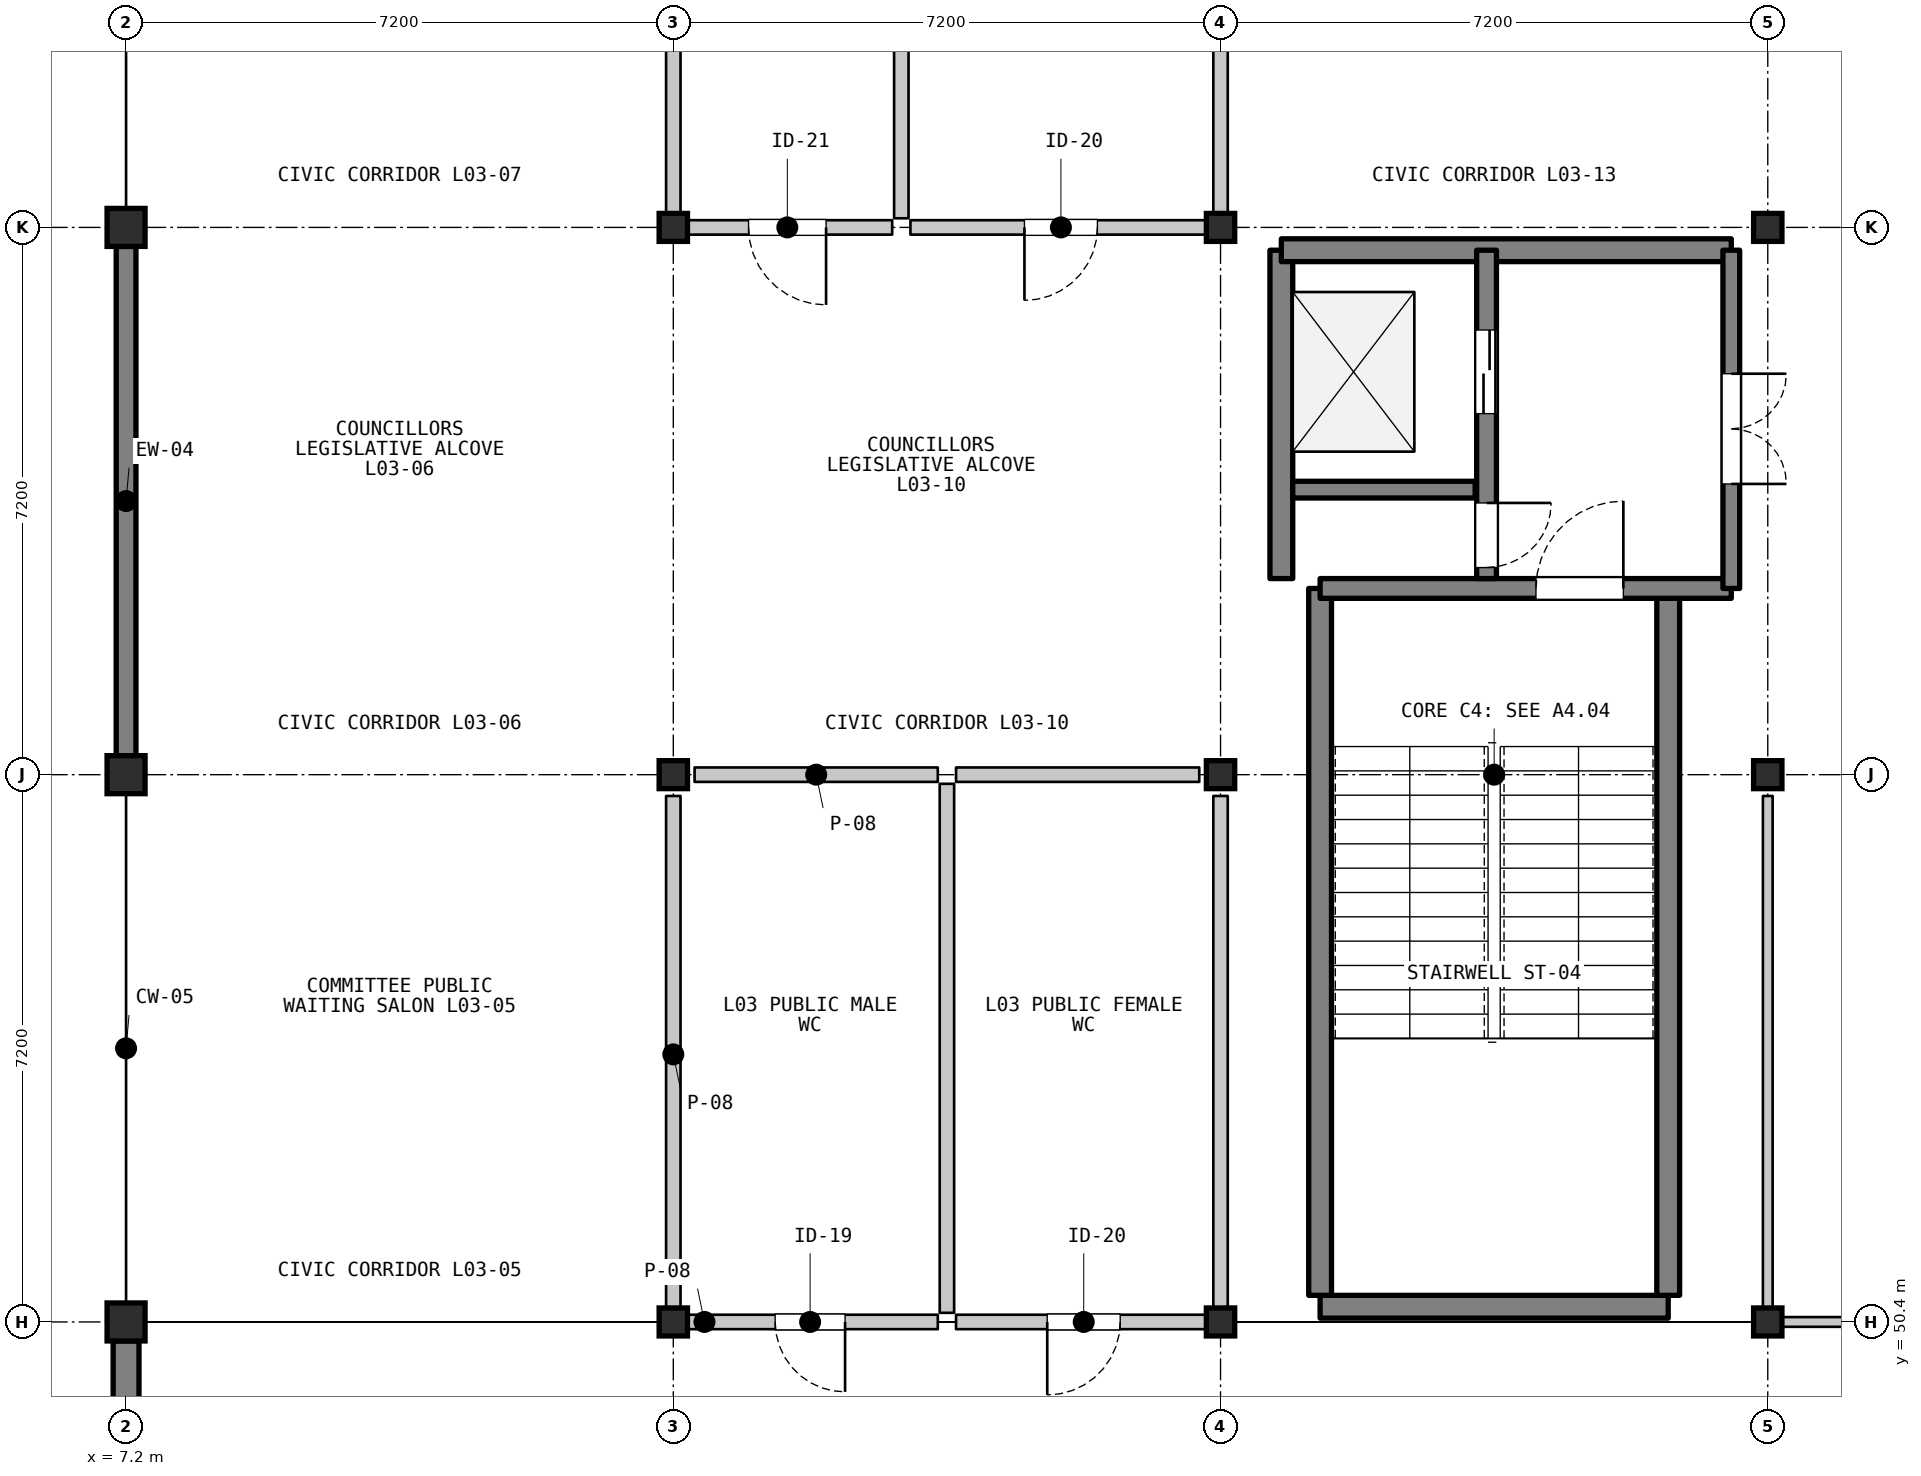
"""IFC4 building model, lengths in metres.
Left out: names, types, materials, properties, quantities, classifications, styles, units other than length and angle.
Written with IfcOpenShell. Run it as: python <this file> out.ifc"""

import sys

from ifc_helpers import new_model, si_unit, direction, frame, frame_2d, origin, origin_2d, place, context, subcontext, project, spatial, rectangle, i_section, extrude, element, fill, save


model = new_model("IFC4")
c1 = context("Model", 3, precision=1e-05, world=origin(), true_north=direction((0.0, 1.0)))
c2 = subcontext(c1, "Body", "Model", "MODEL_VIEW")
j1 = project(units=[si_unit("LENGTHUNIT", "METRE"), si_unit("PLANEANGLEUNIT", "RADIAN")], contexts=[c1])
p1 = place(None, origin())
s1 = spatial("IfcSite", under=j1, at=p1, CompositionType="ELEMENT")
p2 = place(p1, origin())
s2 = spatial("IfcBuilding", under=s1, at=p2, CompositionType="ELEMENT")
p3 = place(p2, frame((0.0, 0.0, 9.9)))
s3 = spatial("IfcBuildingStorey", under=s2, at=p3, CompositionType="ELEMENT", Elevation=9.9)
for number, where, z_axis, x_axis in (
    (1, (7.2, 50.4, 0.0), (0.0, 0.0, 1.0), (1.0, 0.0, 0.0)),
    (2, (7.2, 57.6, 0.0), (0.0, 0.0, 1.0), (1.0, 0.0, 0.0)),
    (3, (7.2, 64.8, 0.0), (0.0, 0.0, 1.0), (1.0, 0.0, 0.0)),
):
    element("IfcColumn", number, at=place(p3, frame(where, z_axis=z_axis, x_axis=x_axis)), inside=s3, PredefinedType="COLUMN", context=c2, shape_type="SweptSolid", body=[
        extrude(rectangle(XDim=0.5, YDim=0.5, at=origin_2d()), origin(), (0.0, 0.0, 1.0), 4.2),
    ])
for number, where, z_axis, x_axis in (
    (4, (14.4, 50.4, 0.0), (0.0, 0.0, 1.0), (1.0, 0.0, 0.0)),
    (5, (14.4, 57.6, 0.0), (0.0, 0.0, 1.0), (1.0, 0.0, 0.0)),
    (6, (14.4, 64.8, 0.0), (0.0, 0.0, 1.0), (1.0, 0.0, 0.0)),
    (7, (21.6, 50.4, 0.0), (0.0, 0.0, 1.0), (1.0, 0.0, 0.0)),
    (8, (21.6, 57.6, 0.0), (0.0, 0.0, 1.0), (1.0, 0.0, 0.0)),
    (9, (21.6, 64.8, 0.0), (0.0, 0.0, 1.0), (1.0, 0.0, 0.0)),
    (10, (28.8, 50.4, 0.0), (0.0, 0.0, 1.0), (1.0, 0.0, 0.0)),
    (11, (28.8, 57.6, 0.0), (0.0, 0.0, 1.0), (1.0, 0.0, 0.0)),
    (12, (28.8, 64.8, 0.0), (0.0, 0.0, 1.0), (1.0, 0.0, 0.0)),
):
    element("IfcColumn", number, at=place(p3, frame(where, z_axis=z_axis, x_axis=x_axis)), inside=s3, PredefinedType="COLUMN", context=c2, shape_type="SweptSolid", body=[
        extrude(i_section(OverallWidth=0.373, OverallDepth=0.368, WebThickness=0.015, FlangeThickness=0.024, FilletRadius=0.015, at=origin_2d()), origin(), (0.0, 0.0, 1.0), 4.2),
    ])
p4 = place(p3, frame((7.2, 43.45, 0.0), z_axis=(0.0, 0.0, 1.0), x_axis=(0.0, 1.0, 0.0)))
e13 = element("IfcWall", 13, at=p4, inside=s3, PredefinedType="SOLIDWALL", context=c2, shape_type="SweptSolid", body=[
    extrude(rectangle(XDim=6.7, YDim=0.34, at=frame_2d((3.35, 0.0))), origin(), (0.0, 0.0, 1.0), 3.467),
])
p5 = place(p3, frame((7.2, 57.85, 0.0), z_axis=(0.0, 0.0, 1.0), x_axis=(0.0, 1.0, 0.0)))
e14 = element("IfcWall", 14, at=p5, inside=s3, PredefinedType="SOLIDWALL", context=c2, shape_type="SweptSolid", body=[
    extrude(rectangle(XDim=6.7, YDim=0.26, at=frame_2d((3.35, 0.0))), origin(), (0.0, 0.0, 1.0), 3.487),
])
p6 = place(p3, frame((22.91, 50.6, 0.0), z_axis=(0.0, 0.0, 1.0), x_axis=(1.0, 0.0, 0.0)))
e15 = element("IfcWall", 15, at=p6, inside=s3, PredefinedType="SHEAR", context=c2, shape_type="SweptSolid", body=[
    extrude(rectangle(XDim=4.58, YDim=0.3, at=frame_2d((2.29, 0.0))), origin(), (0.0, 0.0, 1.0), 4.02),
])
for number, where, z_axis, x_axis in (
    (16, (22.91, 50.75, 0.0), (0.0, 0.0, 1.0), (0.0, 1.0, 0.0)),
    (17, (27.49, 50.75, 0.0), (0.0, 0.0, 1.0), (0.0, 1.0, 0.0)),
):
    element("IfcWall", number, at=place(p3, frame(where, z_axis=z_axis, x_axis=x_axis)), inside=s3, PredefinedType="SHEAR", context=c2, shape_type="SweptSolid", body=[
        extrude(rectangle(XDim=9.3, YDim=0.3, at=frame_2d((4.65, 0.0))), origin(), (0.0, 0.0, 1.0), 4.02),
    ])
p7 = place(p3, frame((22.91, 60.05, 0.0), z_axis=(0.0, 0.0, 1.0), x_axis=(1.0, 0.0, 0.0)))
e18 = element("IfcWall", 18, at=p7, inside=s3, PredefinedType="SHEAR", context=c2, shape_type="SweptSolid", body=[
    extrude(rectangle(XDim=5.41, YDim=0.26, at=frame_2d((2.705, 0.0))), origin(), (0.0, 0.0, 1.0), 4.02),
])
p8 = place(p7, frame((2.84, 0.0, 0.0)))
e19 = element("IfcOpeningElement", 19, at=p8, cuts=e18, PredefinedType="OPENING", context=c2, shape_type="SweptSolid", body=[
    extrude(rectangle(XDim=1.15, YDim=2.15, at=frame_2d((0.575, 1.075))), frame((0.0, 0.14, 0.0), z_axis=(0.0, -1.0, 0.0), x_axis=(1.0, 0.0, 0.0)), (0.0, 0.0, 1.0), 0.28),
])
p9 = place(p3, frame((22.4, 60.18, 0.0), z_axis=(0.0, 0.0, 1.0), x_axis=(0.0, 1.0, 0.0)))
e20 = element("IfcWall", 20, at=p9, inside=s3, PredefinedType="SHEAR", context=c2, shape_type="SweptSolid", body=[
    extrude(rectangle(XDim=4.32, YDim=0.3, at=frame_2d((2.16, 0.0))), origin(), (0.0, 0.0, 1.0), 4.02),
])
p10 = place(p3, frame((22.4, 64.5, 0.0), z_axis=(0.0, 0.0, 1.0), x_axis=(1.0, 0.0, 0.0)))
e21 = element("IfcWall", 21, at=p10, inside=s3, PredefinedType="SHEAR", context=c2, shape_type="SweptSolid", body=[
    extrude(rectangle(XDim=5.92, YDim=0.3, at=frame_2d((2.96, 0.0))), origin(), (0.0, 0.0, 1.0), 4.02),
])
p11 = place(p3, frame((22.55, 61.35, 0.0), z_axis=(0.0, 0.0, 1.0), x_axis=(1.0, 0.0, 0.0)))
e22 = element("IfcWall", 22, at=p11, inside=s3, PredefinedType="SHEAR", context=c2, shape_type="SweptSolid", body=[
    extrude(rectangle(XDim=2.4, YDim=0.22, at=frame_2d((1.2, 0.0))), origin(), (0.0, 0.0, 1.0), 4.02),
])
p12 = place(p3, frame((25.1, 64.5, 0.0), z_axis=(0.0, 0.0, 1.0), x_axis=(0.0, -1.0, 0.0)))
e23 = element("IfcWall", 23, at=p12, inside=s3, PredefinedType="SHEAR", context=c2, shape_type="SweptSolid", body=[
    extrude(rectangle(XDim=4.32, YDim=0.26, at=frame_2d((2.16, 0.0))), origin(), (0.0, 0.0, 1.0), 4.02),
])
p13 = place(p12, frame((1.05, 0.0, 0.0)))
e24 = element("IfcOpeningElement", 24, at=p13, cuts=e23, PredefinedType="OPENING", context=c2, shape_type="SweptSolid", body=[
    extrude(rectangle(XDim=1.1, YDim=2.15, at=frame_2d((0.55, 1.075))), frame((0.0, 0.14, 0.0), z_axis=(0.0, -1.0, 0.0), x_axis=(1.0, 0.0, 0.0)), (0.0, 0.0, 1.0), 0.28),
])
p14 = place(p12, frame((3.325, 0.0, 0.0)))
e25 = element("IfcOpeningElement", 25, at=p14, cuts=e23, PredefinedType="OPENING", context=c2, shape_type="SweptSolid", body=[
    extrude(rectangle(XDim=0.85, YDim=2.05, at=frame_2d((0.425, 1.025))), frame((0.0, 0.14, 0.0), z_axis=(0.0, -1.0, 0.0), x_axis=(1.0, 0.0, 0.0)), (0.0, 0.0, 1.0), 0.28),
])
p15 = place(p3, frame((28.32, 64.5, 0.0), z_axis=(0.0, 0.0, 1.0), x_axis=(0.0, -1.0, 0.0)))
e26 = element("IfcWall", 26, at=p15, inside=s3, PredefinedType="SHEAR", context=c2, shape_type="SweptSolid", body=[
    extrude(rectangle(XDim=4.45, YDim=0.22, at=frame_2d((2.225, 0.0))), origin(), (0.0, 0.0, 1.0), 4.02),
])
p16 = place(p15, frame((1.625, 0.0, 0.0)))
e27 = element("IfcOpeningElement", 27, at=p16, cuts=e26, PredefinedType="OPENING", context=c2, shape_type="SweptSolid", body=[
    extrude(rectangle(XDim=1.45, YDim=2.2, at=frame_2d((0.725, 1.1))), frame((0.0, 0.12, 0.0), z_axis=(0.0, -1.0, 0.0), x_axis=(1.0, 0.0, 0.0)), (0.0, 0.0, 1.0), 0.24),
])
p17 = place(p3, frame((17.88, 50.4, 0.0), z_axis=(0.0, 0.0, 1.0), x_axis=(-1.0, 0.0, 0.0)))
e28 = element("IfcWall", 28, at=p17, inside=s3, PredefinedType="PARTITIONING", context=c2, shape_type="SweptSolid", body=[
    extrude(rectangle(XDim=3.36, YDim=0.19, at=frame_2d((1.68, 0.0))), origin(), (0.0, 0.0, 1.0), 3.388),
])
p18 = place(p17, frame((1.22, 0.0, 0.0)))
e29 = element("IfcOpeningElement", 29, at=p18, cuts=e28, PredefinedType="OPENING", context=c2, shape_type="SweptSolid", body=[
    extrude(rectangle(XDim=0.92, YDim=2.1, at=frame_2d((0.46, 1.05))), frame((0.0, 0.105, 0.0), z_axis=(0.0, -1.0, 0.0), x_axis=(1.0, 0.0, 0.0)), (0.0, 0.0, 1.0), 0.21),
])
p19 = place(p3, frame((14.68, 57.6, 0.0), z_axis=(0.0, 0.0, 1.0), x_axis=(1.0, 0.0, 0.0)))
e30 = element("IfcWall", 30, at=p19, inside=s3, PredefinedType="PARTITIONING", context=c2, shape_type="SweptSolid", body=[
    extrude(rectangle(XDim=3.2, YDim=0.19, at=frame_2d((1.6, 0.0))), origin(), (0.0, 0.0, 1.0), 3.408),
])
p20 = place(p3, frame((14.4, 50.52, 0.0), z_axis=(0.0, 0.0, 1.0), x_axis=(0.0, 1.0, 0.0)))
e31 = element("IfcWall", 31, at=p20, inside=s3, PredefinedType="PARTITIONING", context=c2, shape_type="SweptSolid", body=[
    extrude(rectangle(XDim=6.8, YDim=0.19, at=frame_2d((3.4, 0.0))), origin(), (0.0, 0.0, 1.0), 3.388),
])
p21 = place(p3, frame((18.0, 57.48, 0.0), z_axis=(0.0, 0.0, 1.0), x_axis=(0.0, -1.0, 0.0)))
e32 = element("IfcWall", 32, at=p21, inside=s3, PredefinedType="PARTITIONING", context=c2, shape_type="SweptSolid", body=[
    extrude(rectangle(XDim=6.96, YDim=0.19, at=frame_2d((3.48, 0.0))), origin(), (0.0, 0.0, 1.0), 3.388),
])
p22 = place(p3, frame((21.48, 50.4, 0.0), z_axis=(0.0, 0.0, 1.0), x_axis=(-1.0, 0.0, 0.0)))
e33 = element("IfcWall", 33, at=p22, inside=s3, PredefinedType="PARTITIONING", context=c2, shape_type="SweptSolid", body=[
    extrude(rectangle(XDim=3.36, YDim=0.19, at=frame_2d((1.68, 0.0))), origin(), (0.0, 0.0, 1.0), 3.388),
])
p23 = place(p22, frame((1.2, 0.0, 0.0)))
e34 = element("IfcOpeningElement", 34, at=p23, cuts=e33, PredefinedType="OPENING", context=c2, shape_type="SweptSolid", body=[
    extrude(rectangle(XDim=0.96, YDim=2.1, at=frame_2d((0.48, 1.05))), frame((0.0, 0.105, 0.0), z_axis=(0.0, -1.0, 0.0), x_axis=(1.0, 0.0, 0.0)), (0.0, 0.0, 1.0), 0.21),
])
p24 = place(p3, frame((18.12, 57.6, 0.0), z_axis=(0.0, 0.0, 1.0), x_axis=(1.0, 0.0, 0.0)))
e35 = element("IfcWall", 35, at=p24, inside=s3, PredefinedType="PARTITIONING", context=c2, shape_type="SweptSolid", body=[
    extrude(rectangle(XDim=3.2, YDim=0.19, at=frame_2d((1.6, 0.0))), origin(), (0.0, 0.0, 1.0), 3.408),
])
p25 = place(p3, frame((21.6, 57.32, 0.0), z_axis=(0.0, 0.0, 1.0), x_axis=(0.0, -1.0, 0.0)))
e36 = element("IfcWall", 36, at=p25, inside=s3, PredefinedType="PARTITIONING", context=c2, shape_type="SweptSolid", body=[
    extrude(rectangle(XDim=6.8, YDim=0.19, at=frame_2d((3.4, 0.0))), origin(), (0.0, 0.0, 1.0), 3.388),
])
p26 = place(p3, frame((17.28, 64.8, 0.0), z_axis=(0.0, 0.0, 1.0), x_axis=(-1.0, 0.0, 0.0)))
e37 = element("IfcWall", 37, at=p26, inside=s3, PredefinedType="PARTITIONING", context=c2, shape_type="SweptSolid", body=[
    extrude(rectangle(XDim=2.76, YDim=0.19, at=frame_2d((1.38, 0.0))), origin(), (0.0, 0.0, 1.0), 3.408),
])
p27 = place(p26, frame((0.87, 0.0, 0.0)))
e38 = element("IfcOpeningElement", 38, at=p27, cuts=e37, PredefinedType="OPENING", context=c2, shape_type="SweptSolid", body=[
    extrude(rectangle(XDim=1.02, YDim=2.15, at=frame_2d((0.51, 1.075))), frame((0.0, 0.105, 0.0), z_axis=(0.0, -1.0, 0.0), x_axis=(1.0, 0.0, 0.0)), (0.0, 0.0, 1.0), 0.21),
])
for number, where, z_axis, x_axis in (
    (39, (14.4, 64.92, 0.0), (0.0, 0.0, 1.0), (0.0, 1.0, 0.0)),
    (40, (17.4, 71.88, 0.0), (0.0, 0.0, 1.0), (0.0, -1.0, 0.0)),
):
    element("IfcWall", number, at=place(p3, frame(where, z_axis=z_axis, x_axis=x_axis)), inside=s3, PredefinedType="PARTITIONING", context=c2, shape_type="SweptSolid", body=[
        extrude(rectangle(XDim=6.96, YDim=0.19, at=frame_2d((3.48, 0.0))), origin(), (0.0, 0.0, 1.0), 3.408),
    ])
p28 = place(p3, frame((21.48, 64.8, 0.0), z_axis=(0.0, 0.0, 1.0), x_axis=(-1.0, 0.0, 0.0)))
e41 = element("IfcWall", 41, at=p28, inside=s3, PredefinedType="PARTITIONING", context=c2, shape_type="SweptSolid", body=[
    extrude(rectangle(XDim=3.96, YDim=0.19, at=frame_2d((1.98, 0.0))), origin(), (0.0, 0.0, 1.0), 3.408),
])
p29 = place(p28, frame((1.5, 0.0, 0.0)))
e42 = element("IfcOpeningElement", 42, at=p29, cuts=e41, PredefinedType="OPENING", context=c2, shape_type="SweptSolid", body=[
    extrude(rectangle(XDim=0.96, YDim=2.1, at=frame_2d((0.48, 1.05))), frame((0.0, 0.105, 0.0), z_axis=(0.0, -1.0, 0.0), x_axis=(1.0, 0.0, 0.0)), (0.0, 0.0, 1.0), 0.21),
])
p30 = place(p3, frame((21.6, 71.88, 0.0), z_axis=(0.0, 0.0, 1.0), x_axis=(0.0, -1.0, 0.0)))
e43 = element("IfcWall", 43, at=p30, inside=s3, PredefinedType="PARTITIONING", context=c2, shape_type="SweptSolid", body=[
    extrude(rectangle(XDim=6.96, YDim=0.19, at=frame_2d((3.48, 0.0))), origin(), (0.0, 0.0, 1.0), 3.408),
])
p31 = place(p3, frame((35.88, 50.4, 0.0), z_axis=(0.0, 0.0, 1.0), x_axis=(-1.0, 0.0, 0.0)))
e44 = element("IfcWall", 44, at=p31, inside=s3, PredefinedType="PARTITIONING", context=c2, shape_type="SweptSolid", body=[
    extrude(rectangle(XDim=6.96, YDim=0.128, at=frame_2d((3.48, 0.0))), origin(), (0.0, 0.0, 1.0), 3.388),
])
p32 = place(p31, frame((2.52, 0.0, 0.0)))
e45 = element("IfcOpeningElement", 45, at=p32, cuts=e44, PredefinedType="OPENING", context=c2, shape_type="SweptSolid", body=[
    extrude(rectangle(XDim=1.92, YDim=2.38, at=frame_2d((0.96, 1.19))), frame((0.0, 0.074, 0.0), z_axis=(0.0, -1.0, 0.0), x_axis=(1.0, 0.0, 0.0)), (0.0, 0.0, 1.0), 0.148),
])
p33 = place(p3, frame((28.8, 50.52, 0.0), z_axis=(0.0, 0.0, 1.0), x_axis=(0.0, 1.0, 0.0)))
e46 = element("IfcWall", 46, at=p33, inside=s3, PredefinedType="PARTITIONING", context=c2, shape_type="SweptSolid", body=[
    extrude(rectangle(XDim=6.8, YDim=0.128, at=frame_2d((3.4, 0.0))), origin(), (0.0, 0.0, 1.0), 3.388),
])
p34 = place(p8, origin())
e47 = element("IfcDoor", 47, at=p34, inside=s3, OperationType="SINGLE_SWING_RIGHT", PredefinedType="DOOR", context=c2, shape_type="SweptSolid", body=[
    extrude(rectangle(XDim=1.15, YDim=2.15, at=frame_2d((0.575, 1.075))), frame((0.0, 0.025, 0.0), z_axis=(0.0, -1.0, 0.0), x_axis=(1.0, 0.0, 0.0)), (0.0, 0.0, 1.0), 0.05),
])
fill(e19, e47)
p35 = place(p13, origin())
e48 = element("IfcDoor", 48, at=p35, inside=s3, OperationType="DOUBLE_DOOR_SLIDING", PredefinedType="DOOR", context=c2, shape_type="SweptSolid", body=[
    extrude(rectangle(XDim=1.1, YDim=2.15, at=frame_2d((0.55, 1.075))), frame((0.0, 0.025, 0.0), z_axis=(0.0, -1.0, 0.0), x_axis=(1.0, 0.0, 0.0)), (0.0, 0.0, 1.0), 0.05),
])
fill(e24, e48)
p36 = place(p14, origin())
e49 = element("IfcDoor", 49, at=p36, inside=s3, OperationType="SINGLE_SWING_LEFT", PredefinedType="DOOR", context=c2, shape_type="SweptSolid", body=[
    extrude(rectangle(XDim=0.85, YDim=2.05, at=frame_2d((0.425, 1.025))), frame((0.0, 0.025, 0.0), z_axis=(0.0, -1.0, 0.0), x_axis=(1.0, 0.0, 0.0)), (0.0, 0.0, 1.0), 0.05),
])
fill(e25, e49)
p37 = place(p16, origin())
e50 = element("IfcDoor", 50, at=p37, inside=s3, OperationType="DOUBLE_DOOR_SINGLE_SWING", PredefinedType="DOOR", context=c2, shape_type="SweptSolid", body=[
    extrude(rectangle(XDim=1.45, YDim=2.2, at=frame_2d((0.725, 1.1))), frame((0.0, 0.025, 0.0), z_axis=(0.0, -1.0, 0.0), x_axis=(1.0, 0.0, 0.0)), (0.0, 0.0, 1.0), 0.05),
])
fill(e27, e50)
p38 = place(p18, origin())
e51 = element("IfcDoor", 51, at=p38, inside=s3, OperationType="SINGLE_SWING_LEFT", PredefinedType="DOOR", context=c2, shape_type="SweptSolid", body=[
    extrude(rectangle(XDim=0.92, YDim=2.1, at=frame_2d((0.46, 1.05))), frame((0.0, 0.025, 0.0), z_axis=(0.0, -1.0, 0.0), x_axis=(1.0, 0.0, 0.0)), (0.0, 0.0, 1.0), 0.05),
])
fill(e29, e51)
p39 = place(p23, origin())
e52 = element("IfcDoor", 52, at=p39, inside=s3, OperationType="SINGLE_SWING_RIGHT", PredefinedType="DOOR", context=c2, shape_type="SweptSolid", body=[
    extrude(rectangle(XDim=0.96, YDim=2.1, at=frame_2d((0.48, 1.05))), frame((0.0, 0.025, 0.0), z_axis=(0.0, -1.0, 0.0), x_axis=(1.0, 0.0, 0.0)), (0.0, 0.0, 1.0), 0.05),
])
fill(e34, e52)
p40 = place(p27, origin())
e53 = element("IfcDoor", 53, at=p40, inside=s3, OperationType="SINGLE_SWING_LEFT", PredefinedType="DOOR", context=c2, shape_type="SweptSolid", body=[
    extrude(rectangle(XDim=1.02, YDim=2.15, at=frame_2d((0.51, 1.075))), frame((0.0, 0.025, 0.0), z_axis=(0.0, -1.0, 0.0), x_axis=(1.0, 0.0, 0.0)), (0.0, 0.0, 1.0), 0.05),
])
fill(e38, e53)
p41 = place(p29, origin())
e54 = element("IfcDoor", 54, at=p41, inside=s3, OperationType="SINGLE_SWING_RIGHT", PredefinedType="DOOR", context=c2, shape_type="SweptSolid", body=[
    extrude(rectangle(XDim=0.96, YDim=2.1, at=frame_2d((0.48, 1.05))), frame((0.0, 0.025, 0.0), z_axis=(0.0, -1.0, 0.0), x_axis=(1.0, 0.0, 0.0)), (0.0, 0.0, 1.0), 0.05),
])
fill(e42, e54)
save(model, sys.argv[1])
